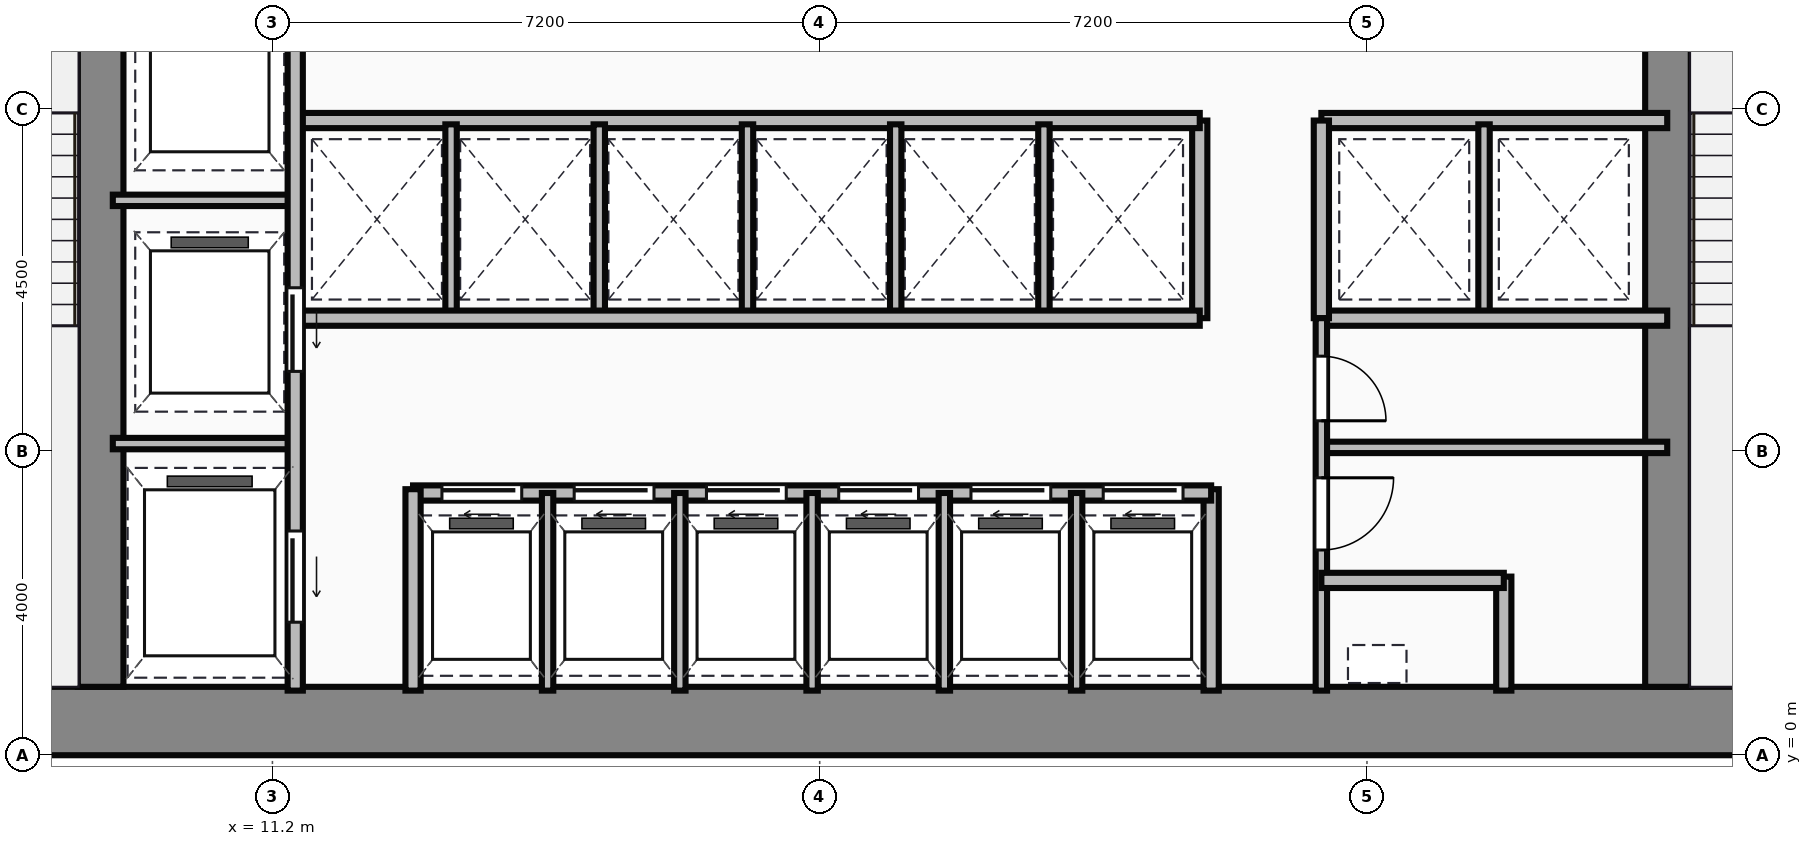
"""IFC4 building model, lengths in metres.
Left out: names, types, materials, properties, quantities, classifications, styles, units other than length and angle.
Written with IfcOpenShell. Run it as: python <this file> out.ifc"""

import sys

from ifc_helpers import new_model, si_unit, direction, frame, frame_2d, origin, place, context, subcontext, project, spatial, rectangle, extrude, source, transform, mapped, element, fill, save


model = new_model("IFC4")
c1 = context("Model", 3, precision=1e-05, world=origin(), true_north=direction((0.0, 1.0)))
c2 = subcontext(c1, "Body", "Model", "MODEL_VIEW")
j1 = project(units=[si_unit("LENGTHUNIT", "METRE"), si_unit("PLANEANGLEUNIT", "RADIAN")], contexts=[c1])
p1 = place(None, origin())
s1 = spatial("IfcSite", under=j1, at=p1, CompositionType="ELEMENT")
p2 = place(p1, origin())
s2 = spatial("IfcBuilding", under=s1, at=p2, CompositionType="ELEMENT")
p3 = place(p2, frame((0.0, 0.0, 39.8)))
s3 = spatial("IfcBuildingStorey", under=s2, at=p3, CompositionType="ELEMENT", Elevation=39.8)
m1 = source(origin(), c2, "Body", "SweptSolid", [
    extrude(rectangle(XDim=29.5, YDim=0.9, at=frame_2d((14.75, 0.0))), origin(), (0.0, 0.0, 1.0), 3.65),
])
p4 = place(p3, frame((4.5, 0.45, 0.0), z_axis=(0.0, 0.0, 1.0), x_axis=(1.0, 0.0, 0.0)))
e1 = element("IfcWall", 1, at=p4, inside=s3, PredefinedType="SHEAR", context=c2, shape_type="MappedRepresentation", body=[
    mapped(m1, transform((0.0, 0.0, 0.0))),
])
m2 = source(origin(), c2, "Body", "SweptSolid", [
    extrude(rectangle(XDim=12.2, YDim=0.6, at=frame_2d((6.1, 0.0))), origin(), (0.0, 0.0, 1.0), 3.65),
])
for number, where, z_axis, x_axis in (
    (2, (8.94, 0.9, 0.0), (0.0, 0.0, 1.0), (0.0, 1.0, 0.0)),
    (3, (29.56, 0.9, 0.0), (0.0, 0.0, 1.0), (0.0, 1.0, 0.0)),
):
    element("IfcWall", number, at=place(p3, frame(where, z_axis=z_axis, x_axis=x_axis)), inside=s3, PredefinedType="SHEAR", context=c2, shape_type="MappedRepresentation", body=[
        mapped(m2, transform((0.0, 0.0, 0.0))),
    ])
m3 = source(origin(), c2, "Body", "SweptSolid", [
    extrude(rectangle(XDim=9.6, YDim=0.2, at=frame_2d((4.8, 0.0))), origin(), (0.0, 0.0, 1.0), 3.4),
])
p5 = place(p3, frame((11.5, 0.85, 0.0), z_axis=(0.0, 0.0, 1.0), x_axis=(0.0, 1.0, 0.0)))
e4 = element("IfcWall", 4, at=p5, inside=s3, PredefinedType="PARTITIONING", context=c2, shape_type="MappedRepresentation", body=[
    mapped(m3, transform((0.0, 0.0, 0.0))),
])
p6 = place(p5, frame((4.2, 0.0, 0.0)))
e5 = element("IfcOpeningElement", 5, at=p6, cuts=e4, PredefinedType="OPENING", context=c2, shape_type="SweptSolid", body=[
    extrude(rectangle(XDim=1.1, YDim=2.15, at=frame_2d((0.55, 1.075))), frame((0.0, 0.11, 0.0), z_axis=(0.0, -1.0, 0.0), x_axis=(1.0, 0.0, 0.0)), (0.0, 0.0, 1.0), 0.22),
])
p7 = place(p5, frame((0.9, 0.0, 0.0)))
e6 = element("IfcOpeningElement", 6, at=p7, cuts=e4, PredefinedType="OPENING", context=c2, shape_type="SweptSolid", body=[
    extrude(rectangle(XDim=1.2, YDim=2.15, at=frame_2d((0.6, 1.075))), frame((0.0, 0.11, 0.0), z_axis=(0.0, -1.0, 0.0), x_axis=(1.0, 0.0, 0.0)), (0.0, 0.0, 1.0), 0.22),
])
m4 = source(origin(), c2, "Body", "SweptSolid", [
    extrude(rectangle(XDim=2.4, YDim=0.15, at=frame_2d((1.2, 0.0))), origin(), (0.0, 0.0, 1.0), 3.4),
])
for number, where, z_axis, x_axis in (
    (7, (9.1, 4.1, 0.0), (0.0, 0.0, 1.0), (1.0, 0.0, 0.0)),
    (8, (9.1, 7.3, 0.0), (0.0, 0.0, 1.0), (1.0, 0.0, 0.0)),
):
    element("IfcWall", number, at=place(p3, frame(where, z_axis=z_axis, x_axis=x_axis)), inside=s3, PredefinedType="PARTITIONING", context=c2, shape_type="MappedRepresentation", body=[
        mapped(m4, transform((0.0, 0.0, 0.0))),
    ])
m5 = source(origin(), c2, "Body", "SweptSolid", [
    extrude(rectangle(XDim=2.65, YDim=0.2, at=frame_2d((1.325, 0.0))), origin(), (0.0, 0.0, 1.0), 3.4),
])
p8 = place(p3, frame((13.05, 0.85, 0.0), z_axis=(0.0, 0.0, 1.0), x_axis=(0.0, 1.0, 0.0)))
e9 = element("IfcWall", 9, at=p8, inside=s3, PredefinedType="PARTITIONING", context=c2, shape_type="MappedRepresentation", body=[
    mapped(m5, transform((0.0, 0.0, 0.0))),
])
m6 = source(origin(), c2, "Body", "SweptSolid", [
    extrude(rectangle(XDim=10.5, YDim=0.2, at=frame_2d((5.25, 0.0))), origin(), (0.0, 0.0, 1.0), 3.4),
])
p9 = place(p3, frame((13.05, 3.45, 0.0), z_axis=(0.0, 0.0, 1.0), x_axis=(1.0, 0.0, 0.0)))
e10 = element("IfcWall", 10, at=p9, inside=s3, PredefinedType="PARTITIONING", context=c2, shape_type="MappedRepresentation", body=[
    mapped(m6, transform((0.0, 0.0, 0.0))),
])
p10 = place(p9, frame((0.38, 0.0, 0.0)))
e11 = element("IfcOpeningElement", 11, at=p10, cuts=e10, PredefinedType="OPENING", context=c2, shape_type="SweptSolid", body=[
    extrude(rectangle(XDim=1.05, YDim=2.15, at=frame_2d((0.525, 1.075))), frame((0.0, 0.11, 0.0), z_axis=(0.0, -1.0, 0.0), x_axis=(1.0, 0.0, 0.0)), (0.0, 0.0, 1.0), 0.22),
])
p11 = place(p9, frame((2.12, 0.0, 0.0)))
e12 = element("IfcOpeningElement", 12, at=p11, cuts=e10, PredefinedType="OPENING", context=c2, shape_type="SweptSolid", body=[
    extrude(rectangle(XDim=1.05, YDim=2.15, at=frame_2d((0.525, 1.075))), frame((0.0, 0.11, 0.0), z_axis=(0.0, -1.0, 0.0), x_axis=(1.0, 0.0, 0.0)), (0.0, 0.0, 1.0), 0.22),
])
p12 = place(p9, frame((3.86, 0.0, 0.0)))
e13 = element("IfcOpeningElement", 13, at=p12, cuts=e10, PredefinedType="OPENING", context=c2, shape_type="SweptSolid", body=[
    extrude(rectangle(XDim=1.05, YDim=2.15, at=frame_2d((0.525, 1.075))), frame((0.0, 0.11, 0.0), z_axis=(0.0, -1.0, 0.0), x_axis=(1.0, 0.0, 0.0)), (0.0, 0.0, 1.0), 0.22),
])
p13 = place(p9, frame((5.6, 0.0, 0.0)))
e14 = element("IfcOpeningElement", 14, at=p13, cuts=e10, PredefinedType="OPENING", context=c2, shape_type="SweptSolid", body=[
    extrude(rectangle(XDim=1.05, YDim=2.15, at=frame_2d((0.525, 1.075))), frame((0.0, 0.11, 0.0), z_axis=(0.0, -1.0, 0.0), x_axis=(1.0, 0.0, 0.0)), (0.0, 0.0, 1.0), 0.22),
])
p14 = place(p9, frame((7.34, 0.0, 0.0)))
e15 = element("IfcOpeningElement", 15, at=p14, cuts=e10, PredefinedType="OPENING", context=c2, shape_type="SweptSolid", body=[
    extrude(rectangle(XDim=1.05, YDim=2.15, at=frame_2d((0.525, 1.075))), frame((0.0, 0.11, 0.0), z_axis=(0.0, -1.0, 0.0), x_axis=(1.0, 0.0, 0.0)), (0.0, 0.0, 1.0), 0.22),
])
p15 = place(p9, frame((9.08, 0.0, 0.0)))
e16 = element("IfcOpeningElement", 16, at=p15, cuts=e10, PredefinedType="OPENING", context=c2, shape_type="SweptSolid", body=[
    extrude(rectangle(XDim=1.05, YDim=2.15, at=frame_2d((0.525, 1.075))), frame((0.0, 0.11, 0.0), z_axis=(0.0, -1.0, 0.0), x_axis=(1.0, 0.0, 0.0)), (0.0, 0.0, 1.0), 0.22),
])
p16 = place(p3, frame((23.55, 0.85, 0.0), z_axis=(0.0, 0.0, 1.0), x_axis=(0.0, 1.0, 0.0)))
e17 = element("IfcWall", 17, at=p16, inside=s3, PredefinedType="PARTITIONING", context=c2, shape_type="MappedRepresentation", body=[
    mapped(m5, transform((0.0, 0.0, 0.0))),
])
m7 = source(origin(), c2, "Body", "SweptSolid", [
    extrude(rectangle(XDim=2.6, YDim=0.15, at=frame_2d((1.3, 0.0))), origin(), (0.0, 0.0, 1.0), 3.4),
])
for number, where, z_axis, x_axis in (
    (18, (14.82, 0.85, 0.0), (0.0, 0.0, 1.0), (0.0, 1.0, 0.0)),
    (19, (16.56, 0.85, 0.0), (0.0, 0.0, 1.0), (0.0, 1.0, 0.0)),
    (20, (18.3, 0.85, 0.0), (0.0, 0.0, 1.0), (0.0, 1.0, 0.0)),
    (21, (20.04, 0.85, 0.0), (0.0, 0.0, 1.0), (0.0, 1.0, 0.0)),
    (22, (21.78, 0.85, 0.0), (0.0, 0.0, 1.0), (0.0, 1.0, 0.0)),
):
    element("IfcWall", number, at=place(p3, frame(where, z_axis=z_axis, x_axis=x_axis)), inside=s3, PredefinedType="PARTITIONING", context=c2, shape_type="MappedRepresentation", body=[
        mapped(m7, transform((0.0, 0.0, 0.0))),
    ])
m8 = source(origin(), c2, "Body", "SweptSolid", [
    extrude(rectangle(XDim=11.85, YDim=0.2, at=frame_2d((5.925, 0.0))), origin(), (0.0, 0.0, 1.0), 3.4),
])
for number, where, z_axis, x_axis in (
    (23, (11.55, 5.75, 0.0), (0.0, 0.0, 1.0), (1.0, 0.0, 0.0)),
    (24, (11.55, 8.35, 0.0), (0.0, 0.0, 1.0), (1.0, 0.0, 0.0)),
):
    element("IfcWall", number, at=place(p3, frame(where, z_axis=z_axis, x_axis=x_axis)), inside=s3, PredefinedType="PARTITIONING", context=c2, shape_type="MappedRepresentation", body=[
        mapped(m8, transform((0.0, 0.0, 0.0))),
    ])
m9 = source(origin(), c2, "Body", "SweptSolid", [
    extrude(rectangle(XDim=2.6, YDim=0.2, at=frame_2d((1.3, 0.0))), origin(), (0.0, 0.0, 1.0), 3.4),
])
p17 = place(p3, frame((23.4, 5.75, 0.0), z_axis=(0.0, 0.0, 1.0), x_axis=(0.0, 1.0, 0.0)))
e25 = element("IfcWall", 25, at=p17, inside=s3, PredefinedType="PARTITIONING", context=c2, shape_type="MappedRepresentation", body=[
    mapped(m9, transform((0.0, 0.0, 0.0))),
])
m10 = source(origin(), c2, "Body", "SweptSolid", [
    extrude(rectangle(XDim=2.5, YDim=0.15, at=frame_2d((1.25, 0.0))), origin(), (0.0, 0.0, 1.0), 3.4),
])
for number, where, z_axis, x_axis in (
    (26, (13.55, 5.8, 0.0), (0.0, 0.0, 1.0), (0.0, 1.0, 0.0)),
    (27, (15.5, 5.8, 0.0), (0.0, 0.0, 1.0), (0.0, 1.0, 0.0)),
    (28, (17.45, 5.8, 0.0), (0.0, 0.0, 1.0), (0.0, 1.0, 0.0)),
    (29, (19.4, 5.8, 0.0), (0.0, 0.0, 1.0), (0.0, 1.0, 0.0)),
    (30, (21.35, 5.8, 0.0), (0.0, 0.0, 1.0), (0.0, 1.0, 0.0)),
):
    element("IfcWall", number, at=place(p3, frame(where, z_axis=z_axis, x_axis=x_axis)), inside=s3, PredefinedType="PARTITIONING", context=c2, shape_type="MappedRepresentation", body=[
        mapped(m10, transform((0.0, 0.0, 0.0))),
    ])
m11 = source(origin(), c2, "Body", "SweptSolid", [
    extrude(rectangle(XDim=4.55, YDim=0.2, at=frame_2d((2.275, 0.0))), origin(), (0.0, 0.0, 1.0), 3.4),
])
for number, where, z_axis, x_axis in (
    (31, (25.0, 8.35, 0.0), (0.0, 0.0, 1.0), (1.0, 0.0, 0.0)),
    (32, (25.0, 5.75, 0.0), (0.0, 0.0, 1.0), (1.0, 0.0, 0.0)),
):
    element("IfcWall", number, at=place(p3, frame(where, z_axis=z_axis, x_axis=x_axis)), inside=s3, PredefinedType="PARTITIONING", context=c2, shape_type="MappedRepresentation", body=[
        mapped(m11, transform((0.0, 0.0, 0.0))),
    ])
p18 = place(p3, frame((25.0, 5.75, 0.0), z_axis=(0.0, 0.0, 1.0), x_axis=(0.0, 1.0, 0.0)))
e33 = element("IfcWall", 33, at=p18, inside=s3, PredefinedType="PARTITIONING", context=c2, shape_type="MappedRepresentation", body=[
    mapped(m9, transform((0.0, 0.0, 0.0))),
])
p19 = place(p3, frame((27.14, 5.8, 0.0), z_axis=(0.0, 0.0, 1.0), x_axis=(0.0, 1.0, 0.0)))
e34 = element("IfcWall", 34, at=p19, inside=s3, PredefinedType="PARTITIONING", context=c2, shape_type="MappedRepresentation", body=[
    mapped(m10, transform((0.0, 0.0, 0.0))),
])
m12 = source(origin(), c2, "Body", "SweptSolid", [
    extrude(rectangle(XDim=4.9, YDim=0.15, at=frame_2d((2.45, 0.0))), origin(), (0.0, 0.0, 1.0), 3.4),
])
p20 = place(p3, frame((25.0, 0.85, 0.0), z_axis=(0.0, 0.0, 1.0), x_axis=(0.0, 1.0, 0.0)))
e35 = element("IfcWall", 35, at=p20, inside=s3, PredefinedType="PARTITIONING", context=c2, shape_type="MappedRepresentation", body=[
    mapped(m12, transform((0.0, 0.0, 0.0))),
])
p21 = place(p20, frame((1.85, 0.0, 0.0)))
e36 = element("IfcOpeningElement", 36, at=p21, cuts=e35, PredefinedType="OPENING", context=c2, shape_type="SweptSolid", body=[
    extrude(rectangle(XDim=0.95, YDim=2.15, at=frame_2d((0.475, 1.075))), frame((0.0, 0.085, 0.0), z_axis=(0.0, -1.0, 0.0), x_axis=(1.0, 0.0, 0.0)), (0.0, 0.0, 1.0), 0.17),
])
p22 = place(p20, frame((3.55, 0.0, 0.0)))
e37 = element("IfcOpeningElement", 37, at=p22, cuts=e35, PredefinedType="OPENING", context=c2, shape_type="SweptSolid", body=[
    extrude(rectangle(XDim=0.85, YDim=2.15, at=frame_2d((0.425, 1.075))), frame((0.0, 0.085, 0.0), z_axis=(0.0, -1.0, 0.0), x_axis=(1.0, 0.0, 0.0)), (0.0, 0.0, 1.0), 0.17),
])
m13 = source(origin(), c2, "Body", "SweptSolid", [
    extrude(rectangle(XDim=2.4, YDim=0.2, at=frame_2d((1.2, 0.0))), origin(), (0.0, 0.0, 1.0), 3.4),
])
p23 = place(p3, frame((25.0, 2.3, 0.0), z_axis=(0.0, 0.0, 1.0), x_axis=(1.0, 0.0, 0.0)))
e38 = element("IfcWall", 38, at=p23, inside=s3, PredefinedType="PARTITIONING", context=c2, shape_type="MappedRepresentation", body=[
    mapped(m13, transform((0.0, 0.0, 0.0))),
])
m14 = source(origin(), c2, "Body", "SweptSolid", [
    extrude(rectangle(XDim=1.5, YDim=0.2, at=frame_2d((0.75, 0.0))), origin(), (0.0, 0.0, 1.0), 3.4),
])
p24 = place(p3, frame((27.4, 0.85, 0.0), z_axis=(0.0, 0.0, 1.0), x_axis=(0.0, 1.0, 0.0)))
e39 = element("IfcWall", 39, at=p24, inside=s3, PredefinedType="PARTITIONING", context=c2, shape_type="MappedRepresentation", body=[
    mapped(m14, transform((0.0, 0.0, 0.0))),
])
m15 = source(origin(), c2, "Body", "SweptSolid", [
    extrude(rectangle(XDim=4.55, YDim=0.15, at=frame_2d((2.275, 0.0))), origin(), (0.0, 0.0, 1.0), 3.4),
])
p25 = place(p3, frame((25.0, 4.05, 0.0), z_axis=(0.0, 0.0, 1.0), x_axis=(1.0, 0.0, 0.0)))
e40 = element("IfcWall", 40, at=p25, inside=s3, PredefinedType="PARTITIONING", context=c2, shape_type="MappedRepresentation", body=[
    mapped(m15, transform((0.0, 0.0, 0.0))),
])
m16 = source(origin(), c2, "Body", "SweptSolid", [
    extrude(rectangle(XDim=1.1, YDim=2.15, at=frame_2d((0.55, 1.075))), frame((0.0, 0.025, 0.0), z_axis=(0.0, -1.0, 0.0), x_axis=(1.0, 0.0, 0.0)), (0.0, 0.0, 1.0), 0.05),
])
p26 = place(p6, frame((1.1, 0.0, 0.0), z_axis=(0.0, 0.0, 1.0), x_axis=(-1.0, 0.0, 0.0)))
e41 = element("IfcDoor", 41, at=p26, inside=s3, OperationType="SLIDING_TO_LEFT", PredefinedType="DOOR", context=c2, shape_type="MappedRepresentation", body=[
    mapped(m16, transform((0.0, 0.0, 0.0))),
])
fill(e5, e41)
m17 = source(origin(), c2, "Body", "SweptSolid", [
    extrude(rectangle(XDim=1.2, YDim=2.15, at=frame_2d((0.6, 1.075))), frame((0.0, 0.025, 0.0), z_axis=(0.0, -1.0, 0.0), x_axis=(1.0, 0.0, 0.0)), (0.0, 0.0, 1.0), 0.05),
])
p27 = place(p7, frame((1.2, 0.0, 0.0), z_axis=(0.0, 0.0, 1.0), x_axis=(-1.0, 0.0, 0.0)))
e42 = element("IfcDoor", 42, at=p27, inside=s3, OperationType="SLIDING_TO_LEFT", PredefinedType="DOOR", context=c2, shape_type="MappedRepresentation", body=[
    mapped(m17, transform((0.0, 0.0, 0.0))),
])
fill(e6, e42)
m18 = source(origin(), c2, "Body", "SweptSolid", [
    extrude(rectangle(XDim=1.05, YDim=2.15, at=frame_2d((0.525, 1.075))), frame((0.0, 0.025, 0.0), z_axis=(0.0, -1.0, 0.0), x_axis=(1.0, 0.0, 0.0)), (0.0, 0.0, 1.0), 0.05),
])
p28 = place(p10, origin())
e43 = element("IfcDoor", 43, at=p28, inside=s3, OperationType="SLIDING_TO_LEFT", PredefinedType="DOOR", context=c2, shape_type="MappedRepresentation", body=[
    mapped(m18, transform((0.0, 0.0, 0.0))),
])
fill(e11, e43)
p29 = place(p11, origin())
e44 = element("IfcDoor", 44, at=p29, inside=s3, OperationType="SLIDING_TO_LEFT", PredefinedType="DOOR", context=c2, shape_type="MappedRepresentation", body=[
    mapped(m18, transform((0.0, 0.0, 0.0))),
])
fill(e12, e44)
p30 = place(p12, origin())
e45 = element("IfcDoor", 45, at=p30, inside=s3, OperationType="SLIDING_TO_LEFT", PredefinedType="DOOR", context=c2, shape_type="MappedRepresentation", body=[
    mapped(m18, transform((0.0, 0.0, 0.0))),
])
fill(e13, e45)
p31 = place(p13, origin())
e46 = element("IfcDoor", 46, at=p31, inside=s3, OperationType="SLIDING_TO_LEFT", PredefinedType="DOOR", context=c2, shape_type="MappedRepresentation", body=[
    mapped(m18, transform((0.0, 0.0, 0.0))),
])
fill(e14, e46)
p32 = place(p14, origin())
e47 = element("IfcDoor", 47, at=p32, inside=s3, OperationType="SLIDING_TO_LEFT", PredefinedType="DOOR", context=c2, shape_type="MappedRepresentation", body=[
    mapped(m18, transform((0.0, 0.0, 0.0))),
])
fill(e15, e47)
p33 = place(p15, origin())
e48 = element("IfcDoor", 48, at=p33, inside=s3, OperationType="SLIDING_TO_LEFT", PredefinedType="DOOR", context=c2, shape_type="MappedRepresentation", body=[
    mapped(m18, transform((0.0, 0.0, 0.0))),
])
fill(e16, e48)
m19 = source(origin(), c2, "Body", "SweptSolid", [
    extrude(rectangle(XDim=0.95, YDim=2.15, at=frame_2d((0.475, 1.075))), frame((0.0, 0.025, 0.0), z_axis=(0.0, -1.0, 0.0), x_axis=(1.0, 0.0, 0.0)), (0.0, 0.0, 1.0), 0.05),
])
p34 = place(p21, origin())
e49 = element("IfcDoor", 49, at=p34, inside=s3, OperationType="SINGLE_SWING_RIGHT", PredefinedType="DOOR", context=c2, shape_type="MappedRepresentation", body=[
    mapped(m19, transform((0.0, 0.0, 0.0))),
])
fill(e36, e49)
m20 = source(origin(), c2, "Body", "SweptSolid", [
    extrude(rectangle(XDim=0.85, YDim=2.15, at=frame_2d((0.425, 1.075))), frame((0.0, 0.025, 0.0), z_axis=(0.0, -1.0, 0.0), x_axis=(1.0, 0.0, 0.0)), (0.0, 0.0, 1.0), 0.05),
])
p35 = place(p22, origin())
e50 = element("IfcDoor", 50, at=p35, inside=s3, OperationType="SINGLE_SWING_LEFT", PredefinedType="DOOR", context=c2, shape_type="MappedRepresentation", body=[
    mapped(m20, transform((0.0, 0.0, 0.0))),
])
fill(e37, e50)
save(model, sys.argv[1])
